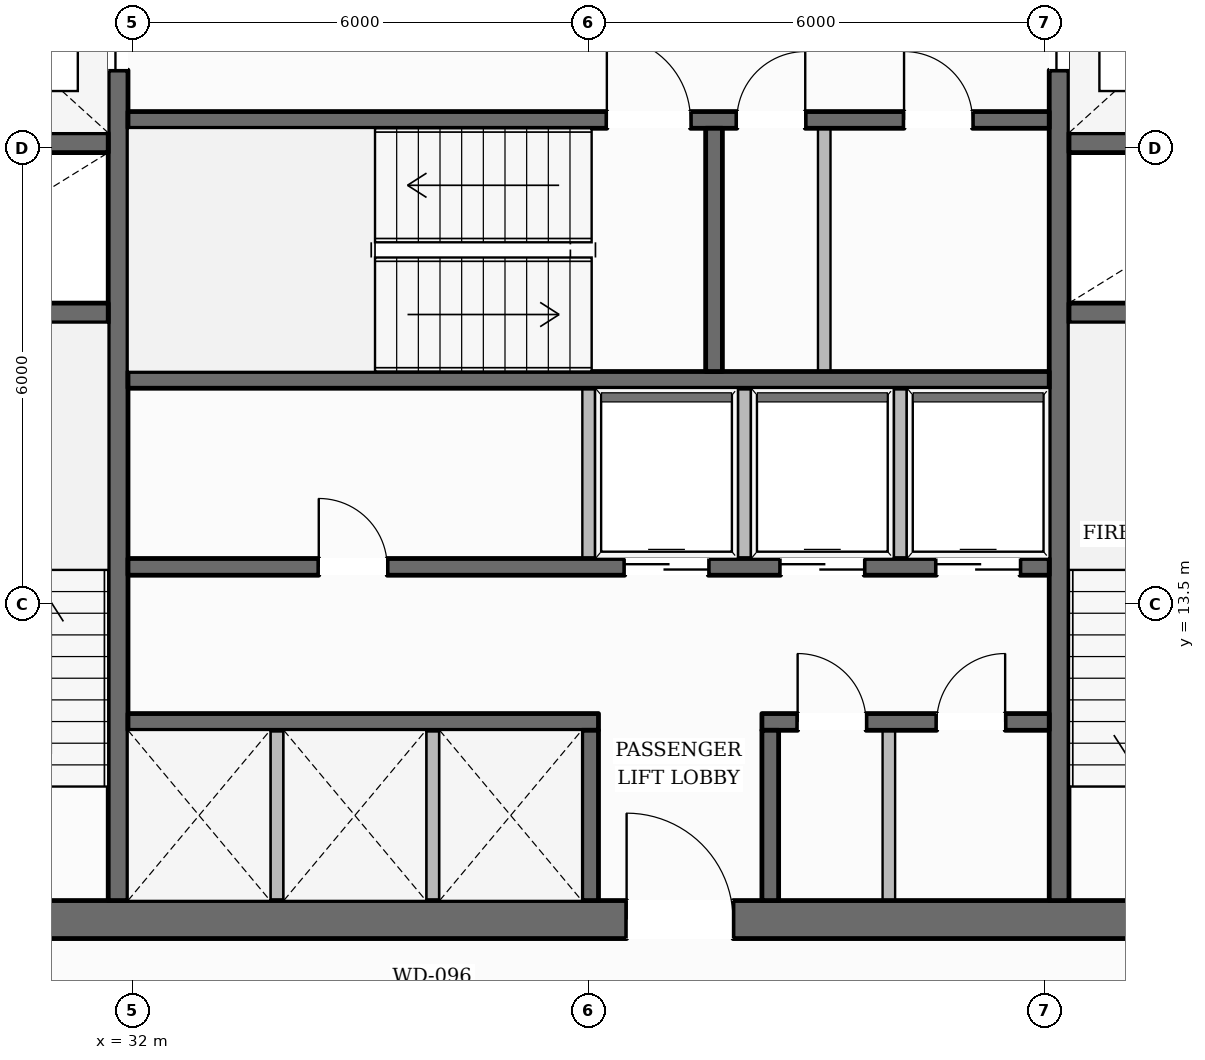
"""IFC4 building model, lengths in metres.
Left out: names, types, materials, properties, quantities, classifications, styles, units other than length and angle.
Written with IfcOpenShell. Run it as: python <this file> out.ifc"""

import sys

from ifc_helpers import new_model, si_unit, direction, frame, frame_2d, origin, place, context, subcontext, project, spatial, rectangle, extrude, element, fill, save


model = new_model("IFC4")
c1 = context("Model", 3, precision=1e-05, world=origin(), true_north=direction((0.0, 1.0)))
c2 = subcontext(c1, "Body", "Model", "MODEL_VIEW")
j1 = project(units=[si_unit("LENGTHUNIT", "METRE"), si_unit("PLANEANGLEUNIT", "RADIAN")], contexts=[c1])
p1 = place(None, origin())
s1 = spatial("IfcSite", under=j1, at=p1, CompositionType="ELEMENT")
p2 = place(p1, origin())
s2 = spatial("IfcBuilding", under=s1, at=p2, CompositionType="ELEMENT")
p3 = place(p2, frame((0.0, 0.0, 150.95)))
s3 = spatial("IfcBuildingStorey", under=s2, at=p3, CompositionType="ELEMENT", Elevation=150.95)
p4 = place(p3, frame((27.98, 9.35, 0.0), z_axis=(0.0, 0.0, 1.0), x_axis=(1.0, 0.0, 0.0)))
e1 = element("IfcWall", 1, at=p4, inside=s3, PredefinedType="SOLIDWALL", context=c2, shape_type="SweptSolid", body=[
    extrude(rectangle(XDim=20.04, YDim=0.5, at=frame_2d((10.02, 0.0))), origin(), (0.0, 0.0, 1.0), 3.43),
])
p5 = place(p4, frame((10.52, 0.0, 0.0)))
e2 = element("IfcOpeningElement", 2, at=p5, cuts=e1, PredefinedType="OPENING", context=c2, shape_type="SweptSolid", body=[
    extrude(rectangle(XDim=1.4, YDim=2.2, at=frame_2d((0.7, 1.1))), frame((0.0, 0.26, 0.0), z_axis=(0.0, -1.0, 0.0), x_axis=(1.0, 0.0, 0.0)), (0.0, 0.0, 1.0), 0.52),
])
p6 = place(p3, frame((31.81, 9.6, 0.0), z_axis=(0.0, 0.0, 1.0), x_axis=(0.0, 1.0, 0.0)))
e3 = element("IfcWall", 3, at=p6, inside=s3, PredefinedType="SHEAR", context=c2, shape_type="SweptSolid", body=[
    extrude(rectangle(XDim=13.0, YDim=0.26, at=frame_2d((6.5, 0.0))), origin(), (0.0, 0.0, 1.0), 3.43),
])
p7 = place(p6, frame((10.925, 0.0, 0.0)))
e4 = element("IfcOpeningElement", 4, at=p7, cuts=e3, PredefinedType="OPENING", context=c2, shape_type="SweptSolid", body=[
    extrude(rectangle(XDim=1.25, YDim=2.25, at=frame_2d((0.625, 1.125))), frame((0.0, 0.14, 0.0), z_axis=(0.0, -1.0, 0.0), x_axis=(1.0, 0.0, 0.0)), (0.0, 0.0, 1.0), 0.28),
])
p8 = place(p3, frame((44.19, 9.6, 0.0), z_axis=(0.0, 0.0, 1.0), x_axis=(0.0, 1.0, 0.0)))
e5 = element("IfcWall", 5, at=p8, inside=s3, PredefinedType="SHEAR", context=c2, shape_type="SweptSolid", body=[
    extrude(rectangle(XDim=13.0, YDim=0.26, at=frame_2d((6.5, 0.0))), origin(), (0.0, 0.0, 1.0), 3.43),
])
p9 = place(p8, frame((10.925, 0.0, 0.0)))
e6 = element("IfcOpeningElement", 6, at=p9, cuts=e5, PredefinedType="OPENING", context=c2, shape_type="SweptSolid", body=[
    extrude(rectangle(XDim=1.25, YDim=2.25, at=frame_2d((0.625, 1.125))), frame((0.0, 0.14, 0.0), z_axis=(0.0, -1.0, 0.0), x_axis=(1.0, 0.0, 0.0)), (0.0, 0.0, 1.0), 0.28),
])
for number, where, z_axis, x_axis in (
    (7, (28.48, 17.33, 0.0), (0.0, 0.0, 1.0), (1.0, 0.0, 0.0)),
    (8, (28.48, 19.57, 0.0), (0.0, 0.0, 1.0), (1.0, 0.0, 0.0)),
    (9, (44.32, 17.33, 0.0), (0.0, 0.0, 1.0), (1.0, 0.0, 0.0)),
    (10, (44.32, 19.57, 0.0), (0.0, 0.0, 1.0), (1.0, 0.0, 0.0)),
):
    element("IfcWall", number, at=place(p3, frame(where, z_axis=z_axis, x_axis=x_axis)), inside=s3, PredefinedType="SHEAR", context=c2, shape_type="SweptSolid", body=[
        extrude(rectangle(XDim=3.2, YDim=0.26, at=frame_2d((1.6, 0.0))), origin(), (0.0, 0.0, 1.0), 3.43),
    ])
p10 = place(p3, frame((31.94, 19.87, 0.0), z_axis=(0.0, 0.0, 1.0), x_axis=(1.0, 0.0, 0.0)))
e11 = element("IfcWall", 11, at=p10, inside=s3, PredefinedType="SOLIDWALL", context=c2, shape_type="SweptSolid", body=[
    extrude(rectangle(XDim=12.12, YDim=0.22, at=frame_2d((6.06, 0.0))), origin(), (0.0, 0.0, 1.0), 3.43),
])
p11 = place(p10, frame((6.3, 0.0, 0.0)))
e12 = element("IfcOpeningElement", 12, at=p11, cuts=e11, PredefinedType="OPENING", context=c2, shape_type="SweptSolid", body=[
    extrude(rectangle(XDim=1.1, YDim=2.15, at=frame_2d((0.55, 1.075))), frame((0.0, 0.12, 0.0), z_axis=(0.0, -1.0, 0.0), x_axis=(1.0, 0.0, 0.0)), (0.0, 0.0, 1.0), 0.24),
])
p12 = place(p10, frame((8.01, 0.0, 0.0)))
e13 = element("IfcOpeningElement", 13, at=p12, cuts=e11, PredefinedType="OPENING", context=c2, shape_type="SweptSolid", body=[
    extrude(rectangle(XDim=0.9, YDim=2.1, at=frame_2d((0.45, 1.05))), frame((0.0, 0.12, 0.0), z_axis=(0.0, -1.0, 0.0), x_axis=(1.0, 0.0, 0.0)), (0.0, 0.0, 1.0), 0.24),
])
p13 = place(p10, frame((10.21, 0.0, 0.0)))
e14 = element("IfcOpeningElement", 14, at=p13, cuts=e11, PredefinedType="OPENING", context=c2, shape_type="SweptSolid", body=[
    extrude(rectangle(XDim=0.9, YDim=2.1, at=frame_2d((0.45, 1.05))), frame((0.0, 0.12, 0.0), z_axis=(0.0, -1.0, 0.0), x_axis=(1.0, 0.0, 0.0)), (0.0, 0.0, 1.0), 0.24),
])
p14 = place(p3, frame((31.94, 16.45, 0.0), z_axis=(0.0, 0.0, 1.0), x_axis=(1.0, 0.0, 0.0)))
e15 = element("IfcWall", 15, at=p14, inside=s3, PredefinedType="SOLIDWALL", context=c2, shape_type="SweptSolid", body=[
    extrude(rectangle(XDim=12.12, YDim=0.22, at=frame_2d((6.06, 0.0))), origin(), (0.0, 0.0, 1.0), 3.43),
])
p15 = place(p3, frame((39.65, 16.56, 0.0), z_axis=(0.0, 0.0, 1.0), x_axis=(0.0, 1.0, 0.0)))
e16 = element("IfcWall", 16, at=p15, inside=s3, PredefinedType="SOLIDWALL", context=c2, shape_type="SweptSolid", body=[
    extrude(rectangle(XDim=3.2, YDim=0.22, at=frame_2d((1.6, 0.0))), origin(), (0.0, 0.0, 1.0), 3.43),
])
p16 = place(p3, frame((31.94, 13.99, 0.0), z_axis=(0.0, 0.0, 1.0), x_axis=(1.0, 0.0, 0.0)))
e17 = element("IfcWall", 17, at=p16, inside=s3, PredefinedType="SOLIDWALL", context=c2, shape_type="SweptSolid", body=[
    extrude(rectangle(XDim=12.12, YDim=0.22, at=frame_2d((6.06, 0.0))), origin(), (0.0, 0.0, 1.0), 3.43),
])
p17 = place(p16, frame((2.51, 0.0, 0.0)))
e18 = element("IfcOpeningElement", 18, at=p17, cuts=e17, PredefinedType="OPENING", context=c2, shape_type="SweptSolid", body=[
    extrude(rectangle(XDim=0.9, YDim=2.1, at=frame_2d((0.45, 1.05))), frame((0.0, 0.12, 0.0), z_axis=(0.0, -1.0, 0.0), x_axis=(1.0, 0.0, 0.0)), (0.0, 0.0, 1.0), 0.24),
])
p18 = place(p16, frame((6.535, 0.0, 0.0)))
e19 = element("IfcOpeningElement", 19, at=p18, cuts=e17, PredefinedType="OPENING", context=c2, shape_type="SweptSolid", body=[
    extrude(rectangle(XDim=1.1, YDim=2.2, at=frame_2d((0.55, 1.1))), frame((0.0, 0.12, 0.0), z_axis=(0.0, -1.0, 0.0), x_axis=(1.0, 0.0, 0.0)), (0.0, 0.0, 1.0), 0.24),
])
p19 = place(p16, frame((8.585, 0.0, 0.0)))
e20 = element("IfcOpeningElement", 20, at=p19, cuts=e17, PredefinedType="OPENING", context=c2, shape_type="SweptSolid", body=[
    extrude(rectangle(XDim=1.1, YDim=2.2, at=frame_2d((0.55, 1.1))), frame((0.0, 0.12, 0.0), z_axis=(0.0, -1.0, 0.0), x_axis=(1.0, 0.0, 0.0)), (0.0, 0.0, 1.0), 0.24),
])
p20 = place(p16, frame((10.635, 0.0, 0.0)))
e21 = element("IfcOpeningElement", 21, at=p20, cuts=e17, PredefinedType="OPENING", context=c2, shape_type="SweptSolid", body=[
    extrude(rectangle(XDim=1.1, YDim=2.2, at=frame_2d((0.55, 1.1))), frame((0.0, 0.12, 0.0), z_axis=(0.0, -1.0, 0.0), x_axis=(1.0, 0.0, 0.0)), (0.0, 0.0, 1.0), 0.24),
])
p21 = place(p3, frame((31.94, 11.95, 0.0), z_axis=(0.0, 0.0, 1.0), x_axis=(1.0, 0.0, 0.0)))
e22 = element("IfcWall", 22, at=p21, inside=s3, PredefinedType="SOLIDWALL", context=c2, shape_type="SweptSolid", body=[
    extrude(rectangle(XDim=6.19, YDim=0.22, at=frame_2d((3.095, 0.0))), origin(), (0.0, 0.0, 1.0), 3.43),
])
p22 = place(p3, frame((40.28, 11.95, 0.0), z_axis=(0.0, 0.0, 1.0), x_axis=(1.0, 0.0, 0.0)))
e23 = element("IfcWall", 23, at=p22, inside=s3, PredefinedType="SOLIDWALL", context=c2, shape_type="SweptSolid", body=[
    extrude(rectangle(XDim=3.78, YDim=0.22, at=frame_2d((1.89, 0.0))), origin(), (0.0, 0.0, 1.0), 3.43),
])
p23 = place(p22, frame((0.47, 0.0, 0.0)))
e24 = element("IfcOpeningElement", 24, at=p23, cuts=e23, PredefinedType="OPENING", context=c2, shape_type="SweptSolid", body=[
    extrude(rectangle(XDim=0.9, YDim=2.1, at=frame_2d((0.45, 1.05))), frame((0.0, 0.12, 0.0), z_axis=(0.0, -1.0, 0.0), x_axis=(1.0, 0.0, 0.0)), (0.0, 0.0, 1.0), 0.24),
])
p24 = place(p22, frame((2.3, 0.0, 0.0)))
e25 = element("IfcOpeningElement", 25, at=p24, cuts=e23, PredefinedType="OPENING", context=c2, shape_type="SweptSolid", body=[
    extrude(rectangle(XDim=0.9, YDim=2.1, at=frame_2d((0.45, 1.05))), frame((0.0, 0.12, 0.0), z_axis=(0.0, -1.0, 0.0), x_axis=(1.0, 0.0, 0.0)), (0.0, 0.0, 1.0), 0.24),
])
for number, where, z_axis, x_axis in (
    (26, (38.02, 9.6, 0.0), (0.0, 0.0, 1.0), (0.0, 1.0, 0.0)),
    (27, (40.39, 9.6, 0.0), (0.0, 0.0, 1.0), (0.0, 1.0, 0.0)),
):
    element("IfcWall", number, at=place(p3, frame(where, z_axis=z_axis, x_axis=x_axis)), inside=s3, PredefinedType="SOLIDWALL", context=c2, shape_type="SweptSolid", body=[
        extrude(rectangle(XDim=2.24, YDim=0.22, at=frame_2d((1.12, 0.0))), origin(), (0.0, 0.0, 1.0), 3.43),
    ])
p25 = place(p3, frame((13.327, 11.879, 0.0), z_axis=(0.0, 0.0, 1.0), x_axis=(0.500913687278, 0.865497243148, 0.0)))
e28 = element("IfcWall", 28, at=p25, inside=s3, PredefinedType="STANDARD", context=c2, shape_type="SweptSolid", body=[
    extrude(rectangle(XDim=38.628, YDim=0.38, at=frame_2d((19.314, 0.0))), origin(), (0.0, 0.0, 1.0), 2.889),
])
p26 = place(p25, frame((9.257, 0.0, 0.0)))
e29 = element("IfcOpeningElement", 29, at=p26, cuts=e28, PredefinedType="OPENING", context=c2, shape_type="SweptSolid", body=[
    extrude(rectangle(XDim=1.0, YDim=2.2, at=frame_2d((0.5, 1.1))), frame((0.0, 0.2, 0.0), z_axis=(0.0, -1.0, 0.0), x_axis=(1.0, 0.0, 0.0)), (0.0, 0.0, 1.0), 0.4),
])
p27 = place(p25, frame((34.239, 0.0, 0.55)))
e30 = element("IfcOpeningElement", 30, at=p27, cuts=e28, PredefinedType="OPENING", context=c2, shape_type="SweptSolid", body=[
    extrude(rectangle(XDim=1.55, YDim=1.6, at=frame_2d((0.775, 0.8))), frame((0.0, 0.2, 0.0), z_axis=(0.0, -1.0, 0.0), x_axis=(1.0, 0.0, 0.0)), (0.0, 0.0, 1.0), 0.4),
])
p28 = place(p25, frame((27.959, 0.0, 0.55)))
e31 = element("IfcOpeningElement", 31, at=p28, cuts=e28, PredefinedType="OPENING", context=c2, shape_type="SweptSolid", body=[
    extrude(rectangle(XDim=1.55, YDim=1.6, at=frame_2d((0.775, 0.8))), frame((0.0, 0.2, 0.0), z_axis=(0.0, -1.0, 0.0), x_axis=(1.0, 0.0, 0.0)), (0.0, 0.0, 1.0), 0.4),
])
p29 = place(p25, frame((21.679, 0.0, 0.55)))
e32 = element("IfcOpeningElement", 32, at=p29, cuts=e28, PredefinedType="OPENING", context=c2, shape_type="SweptSolid", body=[
    extrude(rectangle(XDim=1.55, YDim=1.6, at=frame_2d((0.775, 0.8))), frame((0.0, 0.2, 0.0), z_axis=(0.0, -1.0, 0.0), x_axis=(1.0, 0.0, 0.0)), (0.0, 0.0, 1.0), 0.4),
])
p30 = place(p25, frame((2.84, 0.0, 0.55)))
e33 = element("IfcOpeningElement", 33, at=p30, cuts=e28, PredefinedType="OPENING", context=c2, shape_type="SweptSolid", body=[
    extrude(rectangle(XDim=1.55, YDim=1.6, at=frame_2d((0.775, 0.8))), frame((0.0, 0.2, 0.0), z_axis=(0.0, -1.0, 0.0), x_axis=(1.0, 0.0, 0.0)), (0.0, 0.0, 1.0), 0.4),
])
p31 = place(p3, frame((43.179, 45.396, 0.0), z_axis=(0.0, 0.0, 1.0), x_axis=(0.494363218784, -0.869255433065, 0.0)))
e34 = element("IfcWall", 34, at=p31, inside=s3, PredefinedType="STANDARD", context=c2, shape_type="SweptSolid", body=[
    extrude(rectangle(XDim=38.134, YDim=0.38, at=frame_2d((19.067, 0.0))), origin(), (0.0, 0.0, 1.0), 2.889),
])
p32 = place(p31, frame((9.134, 0.0, 0.0)))
e35 = element("IfcOpeningElement", 35, at=p32, cuts=e34, PredefinedType="OPENING", context=c2, shape_type="SweptSolid", body=[
    extrude(rectangle(XDim=1.0, YDim=2.2, at=frame_2d((0.5, 1.1))), frame((0.0, 0.2, 0.0), z_axis=(0.0, -1.0, 0.0), x_axis=(1.0, 0.0, 0.0)), (0.0, 0.0, 1.0), 0.4),
])
p33 = place(p31, frame((33.785, 0.0, 0.55)))
e36 = element("IfcOpeningElement", 36, at=p33, cuts=e34, PredefinedType="OPENING", context=c2, shape_type="SweptSolid", body=[
    extrude(rectangle(XDim=1.55, YDim=1.6, at=frame_2d((0.775, 0.8))), frame((0.0, 0.2, 0.0), z_axis=(0.0, -1.0, 0.0), x_axis=(1.0, 0.0, 0.0)), (0.0, 0.0, 1.0), 0.4),
])
p34 = place(p31, frame((27.589, 0.0, 0.55)))
e37 = element("IfcOpeningElement", 37, at=p34, cuts=e34, PredefinedType="OPENING", context=c2, shape_type="SweptSolid", body=[
    extrude(rectangle(XDim=1.55, YDim=1.6, at=frame_2d((0.775, 0.8))), frame((0.0, 0.2, 0.0), z_axis=(0.0, -1.0, 0.0), x_axis=(1.0, 0.0, 0.0)), (0.0, 0.0, 1.0), 0.4),
])
p35 = place(p31, frame((21.393, 0.0, 0.55)))
e38 = element("IfcOpeningElement", 38, at=p35, cuts=e34, PredefinedType="OPENING", context=c2, shape_type="SweptSolid", body=[
    extrude(rectangle(XDim=1.55, YDim=1.6, at=frame_2d((0.775, 0.8))), frame((0.0, 0.2, 0.0), z_axis=(0.0, -1.0, 0.0), x_axis=(1.0, 0.0, 0.0)), (0.0, 0.0, 1.0), 0.4),
])
p36 = place(p31, frame((2.805, 0.0, 0.55)))
e39 = element("IfcOpeningElement", 39, at=p36, cuts=e34, PredefinedType="OPENING", context=c2, shape_type="SweptSolid", body=[
    extrude(rectangle(XDim=1.55, YDim=1.6, at=frame_2d((0.775, 0.8))), frame((0.0, 0.2, 0.0), z_axis=(0.0, -1.0, 0.0), x_axis=(1.0, 0.0, 0.0)), (0.0, 0.0, 1.0), 0.4),
])
for number, where, z_axis, x_axis in (
    (40, (33.9, 9.55, 0.0), (0.0, 0.0, 1.0), (0.0, 1.0, 0.0)),
    (41, (35.95, 9.55, 0.0), (0.0, 0.0, 1.0), (0.0, 1.0, 0.0)),
):
    element("IfcWall", number, at=place(p3, frame(where, z_axis=z_axis, x_axis=x_axis)), inside=s3, PredefinedType="PARTITIONING", context=c2, shape_type="SweptSolid", body=[
        extrude(rectangle(XDim=2.29, YDim=0.165, at=frame_2d((1.145, 0.0))), origin(), (0.0, 0.0, 1.0), 3.43),
    ])
for number, where, z_axis, x_axis in (
    (42, (38.0, 14.1, 0.0), (0.0, 0.0, 1.0), (0.0, 1.0, 0.0)),
    (43, (40.05, 14.1, 0.0), (0.0, 0.0, 1.0), (0.0, 1.0, 0.0)),
    (44, (42.1, 14.1, 0.0), (0.0, 0.0, 1.0), (0.0, 1.0, 0.0)),
):
    element("IfcWall", number, at=place(p3, frame(where, z_axis=z_axis, x_axis=x_axis)), inside=s3, PredefinedType="PARTITIONING", context=c2, shape_type="SweptSolid", body=[
        extrude(rectangle(XDim=2.24, YDim=0.165, at=frame_2d((1.12, 0.0))), origin(), (0.0, 0.0, 1.0), 3.43),
    ])
p37 = place(p3, frame((41.1, 16.56, 0.0), z_axis=(0.0, 0.0, 1.0), x_axis=(0.0, 1.0, 0.0)))
e45 = element("IfcWall", 45, at=p37, inside=s3, PredefinedType="PARTITIONING", context=c2, shape_type="SweptSolid", body=[
    extrude(rectangle(XDim=3.2, YDim=0.165, at=frame_2d((1.6, 0.0))), origin(), (0.0, 0.0, 1.0), 3.43),
])
p38 = place(p3, frame((41.95, 9.55, 0.0), z_axis=(0.0, 0.0, 1.0), x_axis=(0.0, 1.0, 0.0)))
e46 = element("IfcWall", 46, at=p38, inside=s3, PredefinedType="PARTITIONING", context=c2, shape_type="SweptSolid", body=[
    extrude(rectangle(XDim=2.29, YDim=0.165, at=frame_2d((1.145, 0.0))), origin(), (0.0, 0.0, 1.0), 3.43),
])
p39 = place(p11, origin())
e47 = element("IfcDoor", 47, at=p39, inside=s3, OperationType="SINGLE_SWING_LEFT", PredefinedType="DOOR", context=c2, shape_type="SweptSolid", body=[
    extrude(rectangle(XDim=1.1, YDim=2.15, at=frame_2d((0.55, 1.075))), frame((0.0, 0.025, 0.0), z_axis=(0.0, -1.0, 0.0), x_axis=(1.0, 0.0, 0.0)), (0.0, 0.0, 1.0), 0.05),
])
fill(e12, e47)
p40 = place(p7, origin())
e48 = element("IfcDoor", 48, at=p40, inside=s3, OperationType="DOUBLE_DOOR_SLIDING", PredefinedType="DOOR", context=c2, shape_type="SweptSolid", body=[
    extrude(rectangle(XDim=1.25, YDim=2.25, at=frame_2d((0.625, 1.125))), frame((0.0, 0.025, 0.0), z_axis=(0.0, -1.0, 0.0), x_axis=(1.0, 0.0, 0.0)), (0.0, 0.0, 1.0), 0.05),
])
fill(e4, e48)
p41 = place(p9, origin())
e49 = element("IfcDoor", 49, at=p41, inside=s3, OperationType="DOUBLE_DOOR_SLIDING", PredefinedType="DOOR", context=c2, shape_type="SweptSolid", body=[
    extrude(rectangle(XDim=1.25, YDim=2.25, at=frame_2d((0.625, 1.125))), frame((0.0, 0.025, 0.0), z_axis=(0.0, -1.0, 0.0), x_axis=(1.0, 0.0, 0.0)), (0.0, 0.0, 1.0), 0.05),
])
fill(e6, e49)
p42 = place(p5, origin())
e50 = element("IfcDoor", 50, at=p42, inside=s3, OperationType="SINGLE_SWING_LEFT", PredefinedType="DOOR", context=c2, shape_type="SweptSolid", body=[
    extrude(rectangle(XDim=1.4, YDim=2.2, at=frame_2d((0.7, 1.1))), frame((0.0, 0.025, 0.0), z_axis=(0.0, -1.0, 0.0), x_axis=(1.0, 0.0, 0.0)), (0.0, 0.0, 1.0), 0.05),
])
fill(e2, e50)
p43 = place(p17, origin())
e51 = element("IfcDoor", 51, at=p43, inside=s3, OperationType="SINGLE_SWING_LEFT", PredefinedType="DOOR", context=c2, shape_type="SweptSolid", body=[
    extrude(rectangle(XDim=0.9, YDim=2.1, at=frame_2d((0.45, 1.05))), frame((0.0, 0.025, 0.0), z_axis=(0.0, -1.0, 0.0), x_axis=(1.0, 0.0, 0.0)), (0.0, 0.0, 1.0), 0.05),
])
fill(e18, e51)
p44 = place(p18, origin())
e52 = element("IfcDoor", 52, at=p44, inside=s3, OperationType="DOUBLE_DOOR_SLIDING", PredefinedType="DOOR", context=c2, shape_type="SweptSolid", body=[
    extrude(rectangle(XDim=1.1, YDim=2.2, at=frame_2d((0.55, 1.1))), frame((0.0, 0.025, 0.0), z_axis=(0.0, -1.0, 0.0), x_axis=(1.0, 0.0, 0.0)), (0.0, 0.0, 1.0), 0.05),
])
fill(e19, e52)
p45 = place(p19, origin())
e53 = element("IfcDoor", 53, at=p45, inside=s3, OperationType="DOUBLE_DOOR_SLIDING", PredefinedType="DOOR", context=c2, shape_type="SweptSolid", body=[
    extrude(rectangle(XDim=1.1, YDim=2.2, at=frame_2d((0.55, 1.1))), frame((0.0, 0.025, 0.0), z_axis=(0.0, -1.0, 0.0), x_axis=(1.0, 0.0, 0.0)), (0.0, 0.0, 1.0), 0.05),
])
fill(e20, e53)
p46 = place(p20, origin())
e54 = element("IfcDoor", 54, at=p46, inside=s3, OperationType="DOUBLE_DOOR_SLIDING", PredefinedType="DOOR", context=c2, shape_type="SweptSolid", body=[
    extrude(rectangle(XDim=1.1, YDim=2.2, at=frame_2d((0.55, 1.1))), frame((0.0, 0.025, 0.0), z_axis=(0.0, -1.0, 0.0), x_axis=(1.0, 0.0, 0.0)), (0.0, 0.0, 1.0), 0.05),
])
fill(e21, e54)
p47 = place(p12, origin())
e55 = element("IfcDoor", 55, at=p47, inside=s3, OperationType="SINGLE_SWING_RIGHT", PredefinedType="DOOR", context=c2, shape_type="SweptSolid", body=[
    extrude(rectangle(XDim=0.9, YDim=2.1, at=frame_2d((0.45, 1.05))), frame((0.0, 0.025, 0.0), z_axis=(0.0, -1.0, 0.0), x_axis=(1.0, 0.0, 0.0)), (0.0, 0.0, 1.0), 0.05),
])
fill(e13, e55)
p48 = place(p13, origin())
e56 = element("IfcDoor", 56, at=p48, inside=s3, OperationType="SINGLE_SWING_LEFT", PredefinedType="DOOR", context=c2, shape_type="SweptSolid", body=[
    extrude(rectangle(XDim=0.9, YDim=2.1, at=frame_2d((0.45, 1.05))), frame((0.0, 0.025, 0.0), z_axis=(0.0, -1.0, 0.0), x_axis=(1.0, 0.0, 0.0)), (0.0, 0.0, 1.0), 0.05),
])
fill(e14, e56)
p49 = place(p23, origin())
e57 = element("IfcDoor", 57, at=p49, inside=s3, OperationType="SINGLE_SWING_LEFT", PredefinedType="DOOR", context=c2, shape_type="SweptSolid", body=[
    extrude(rectangle(XDim=0.9, YDim=2.1, at=frame_2d((0.45, 1.05))), frame((0.0, 0.025, 0.0), z_axis=(0.0, -1.0, 0.0), x_axis=(1.0, 0.0, 0.0)), (0.0, 0.0, 1.0), 0.05),
])
fill(e24, e57)
p50 = place(p24, origin())
e58 = element("IfcDoor", 58, at=p50, inside=s3, OperationType="SINGLE_SWING_RIGHT", PredefinedType="DOOR", context=c2, shape_type="SweptSolid", body=[
    extrude(rectangle(XDim=0.9, YDim=2.1, at=frame_2d((0.45, 1.05))), frame((0.0, 0.025, 0.0), z_axis=(0.0, -1.0, 0.0), x_axis=(1.0, 0.0, 0.0)), (0.0, 0.0, 1.0), 0.05),
])
fill(e25, e58)
save(model, sys.argv[1])
